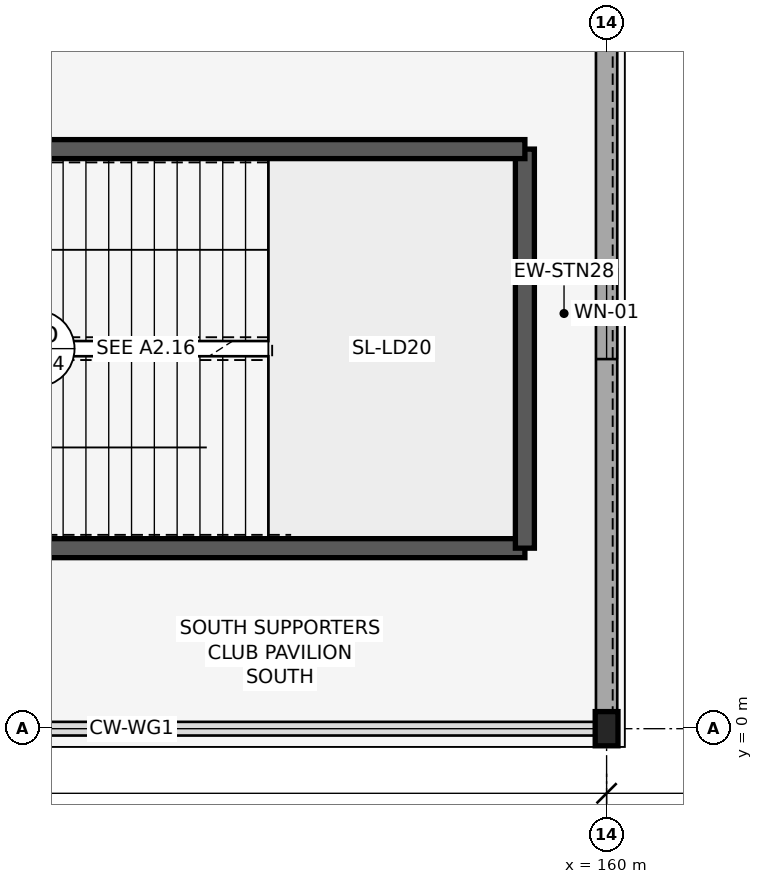
"""IFC4 building model, lengths in metres.
Left out: names, types, materials, properties, quantities, classifications, styles, units other than length and angle.
Written with IfcOpenShell. Run it as: python <this file> out.ifc"""

import sys

from ifc_helpers import new_model, si_unit, direction, frame, frame_2d, origin, origin_2d, place, context, subcontext, project, spatial, rectangle, i_section, extrude, element, fill, save


model = new_model("IFC4")
c1 = context("Model", 3, precision=1e-05, world=origin(), true_north=direction((0.0, 1.0)))
c2 = subcontext(c1, "Body", "Model", "MODEL_VIEW")
j1 = project(units=[si_unit("LENGTHUNIT", "METRE"), si_unit("PLANEANGLEUNIT", "RADIAN")], contexts=[c1])
p1 = place(None, origin())
s1 = spatial("IfcSite", under=j1, at=p1, CompositionType="ELEMENT")
p2 = place(p1, origin())
s2 = spatial("IfcBuilding", under=s1, at=p2, CompositionType="ELEMENT")
p3 = place(p2, frame((0.0, 0.0, 5.4)))
s3 = spatial("IfcBuildingStorey", under=s2, at=p3, CompositionType="ELEMENT", Elevation=5.4)
p4 = place(p3, frame((160.0, 0.0, 0.0), z_axis=(0.0, 0.0, 1.0), x_axis=(1.0, 0.0, 0.0)))
e1 = element("IfcColumn", 1, at=p4, inside=s3, PredefinedType="COLUMN", context=c2, shape_type="SweptSolid", body=[
    extrude(i_section(OverallWidth=0.3, OverallDepth=0.45, WebThickness=0.014, FlangeThickness=0.026, FilletRadius=0.027, at=origin_2d()), origin(), (0.0, 0.0, 1.0), 5.2),
])
p5 = place(p3, frame((160.0, 0.222, 0.0), z_axis=(0.0, 0.0, 1.0), x_axis=(0.0, 1.0, 0.0)))
e2 = element("IfcWall", 2, at=p5, inside=s3, PredefinedType="STANDARD", context=c2, shape_type="SweptSolid", body=[
    extrude(rectangle(XDim=10.481, YDim=0.28, at=frame_2d((5.24, 0.0))), origin(), (0.0, 0.0, 1.0), 4.3),
])
p6 = place(p5, frame((4.64, 0.0, 0.95)))
e3 = element("IfcOpeningElement", 3, at=p6, cuts=e2, PredefinedType="OPENING", context=c2, shape_type="SweptSolid", body=[
    extrude(rectangle(XDim=1.2, YDim=1.35, at=frame_2d((0.6, 0.675))), frame((0.0, 0.15, 0.0), z_axis=(0.0, -1.0, 0.0), x_axis=(1.0, 0.0, 0.0)), (0.0, 0.0, 1.0), 0.3),
])
p7 = place(p3, frame((148.475, 2.375, 0.0), z_axis=(0.0, 0.0, 1.0), x_axis=(1.0, 0.0, 0.0)))
e4 = element("IfcWall", 4, at=p7, inside=s3, PredefinedType="SHEAR", context=c2, shape_type="SweptSolid", body=[
    extrude(rectangle(XDim=10.45, YDim=0.25, at=frame_2d((5.225, 0.0))), origin(), (0.0, 0.0, 1.0), 4.92),
])
p8 = place(p3, frame((158.925, 2.375, 0.0), z_axis=(0.0, 0.0, 1.0), x_axis=(0.0, 1.0, 0.0)))
e5 = element("IfcWall", 5, at=p8, inside=s3, PredefinedType="SHEAR", context=c2, shape_type="SweptSolid", body=[
    extrude(rectangle(XDim=5.25, YDim=0.25, at=frame_2d((2.625, 0.0))), origin(), (0.0, 0.0, 1.0), 4.92),
])
p9 = place(p3, frame((158.925, 7.625, 0.0), z_axis=(0.0, 0.0, 1.0), x_axis=(-1.0, 0.0, 0.0)))
e6 = element("IfcWall", 6, at=p9, inside=s3, PredefinedType="SHEAR", context=c2, shape_type="SweptSolid", body=[
    extrude(rectangle(XDim=10.45, YDim=0.25, at=frame_2d((5.225, 0.0))), origin(), (0.0, 0.0, 1.0), 4.92),
])
p10 = place(p6, origin())
e7 = element("IfcWindow", 7, at=p10, inside=s3, PartitioningType="SINGLE_PANEL", PredefinedType="WINDOW", context=c2, shape_type="SweptSolid", body=[
    extrude(rectangle(XDim=1.2, YDim=1.35, at=frame_2d((0.6, 0.675))), frame((0.0, 0.03, 0.0), z_axis=(0.0, -1.0, 0.0), x_axis=(1.0, 0.0, 0.0)), (0.0, 0.0, 1.0), 0.06),
])
fill(e3, e7)
save(model, sys.argv[1])
